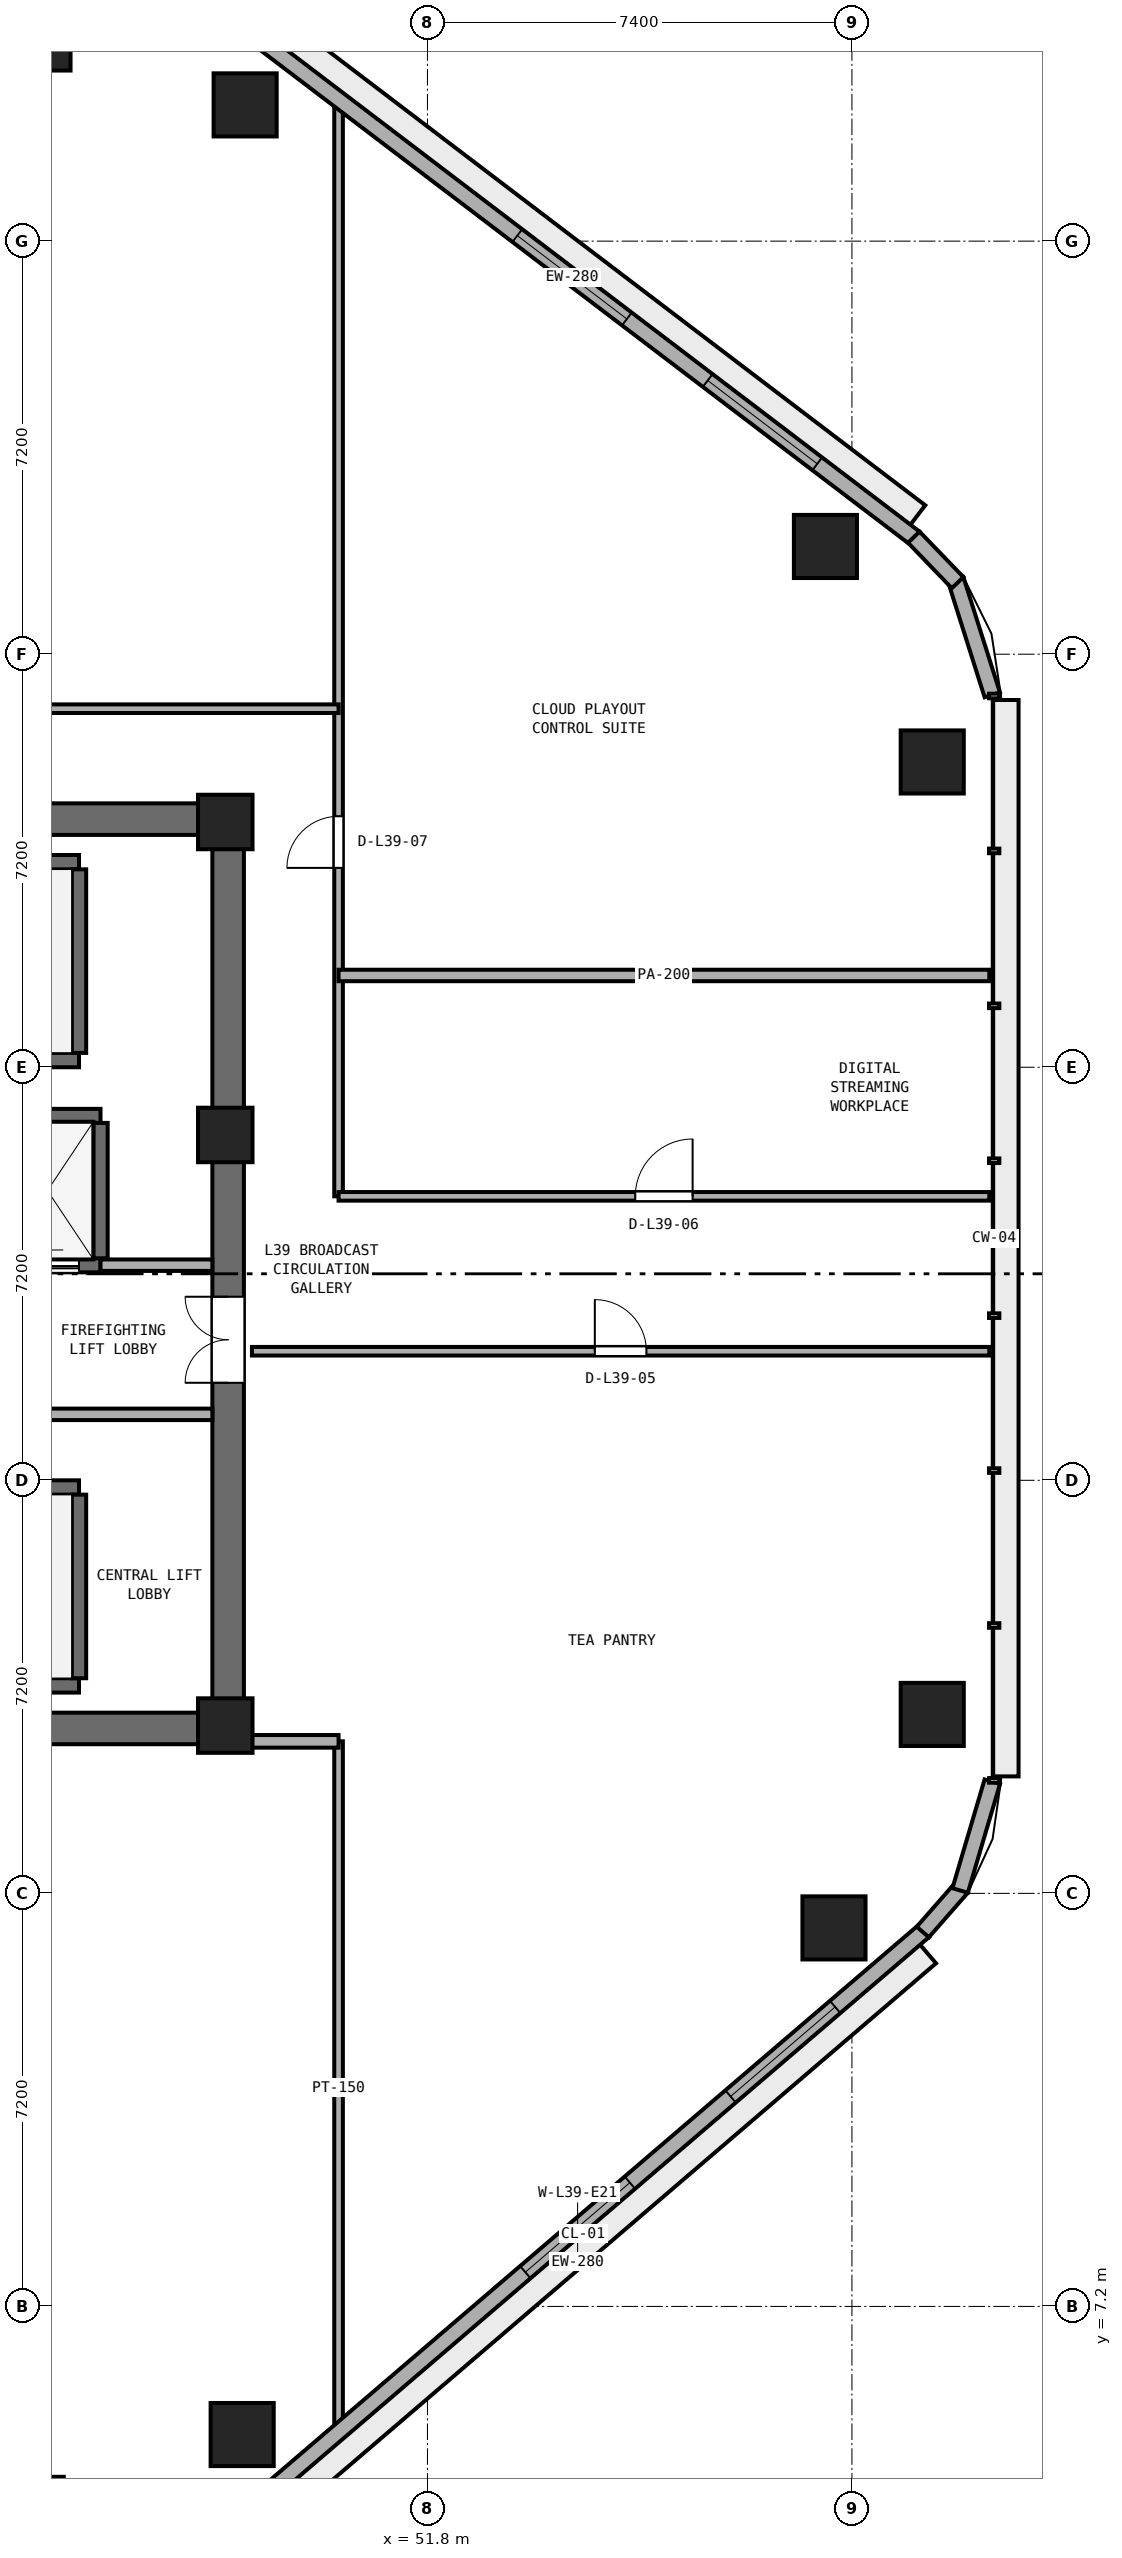
"""IFC4 building model, lengths in metres.
Left out: names, types, materials, properties, quantities, classifications, styles, units other than length and angle.
Written with IfcOpenShell. Run it as: python <this file> out.ifc"""

import sys

from ifc_helpers import new_model, si_unit, direction, frame, frame_2d, origin, origin_2d, place, context, subcontext, project, spatial, rectangle, extrude, element, fill, save


model = new_model("IFC4")
c1 = context("Model", 3, precision=1e-05, world=origin(), true_north=direction((0.0, 1.0)))
c2 = subcontext(c1, "Body", "Model", "MODEL_VIEW")
j1 = project(units=[si_unit("LENGTHUNIT", "METRE"), si_unit("PLANEANGLEUNIT", "RADIAN")], contexts=[c1])
p1 = place(None, origin())
s1 = spatial("IfcSite", under=j1, at=p1, CompositionType="ELEMENT")
p2 = place(p1, origin())
s2 = spatial("IfcBuilding", under=s1, at=p2, CompositionType="ELEMENT")
p3 = place(p2, frame((0.0, 0.0, 155.4)))
s3 = spatial("IfcBuildingStorey", under=s2, at=p3, CompositionType="ELEMENT", Elevation=155.4)
for number, where, z_axis, x_axis in (
    (1, (25.4, 17.275, 0.0), (0.0, 0.0, 1.0), (1.0, 0.0, 0.0)),
    (2, (25.4, 33.125, 0.0), (0.0, 0.0, 1.0), (1.0, 0.0, 0.0)),
):
    element("IfcWall", number, at=place(p3, frame(where, z_axis=z_axis, x_axis=x_axis)), inside=s3, PredefinedType="SHEAR", context=c2, shape_type="SweptSolid", body=[
        extrude(rectangle(XDim=23.2, YDim=0.55, at=frame_2d((11.6, 0.0))), origin(), (0.0, 0.0, 1.0), 3.54),
    ])
p4 = place(p3, frame((48.325, 17.55, 0.0), z_axis=(0.0, 0.0, 1.0), x_axis=(0.0, 1.0, 0.0)))
e3 = element("IfcWall", 3, at=p4, inside=s3, PredefinedType="SHEAR", context=c2, shape_type="SweptSolid", body=[
    extrude(rectangle(XDim=15.3, YDim=0.55, at=frame_2d((7.65, 0.0))), origin(), (0.0, 0.0, 1.0), 3.54),
])
p5 = place(p4, frame((5.75, 0.0, 0.0)))
e4 = element("IfcOpeningElement", 4, at=p5, cuts=e3, PredefinedType="OPENING", context=c2, shape_type="SweptSolid", body=[
    extrude(rectangle(XDim=1.5, YDim=2.15, at=frame_2d((0.75, 1.075))), frame((0.0, 0.285, 0.0), z_axis=(0.0, -1.0, 0.0), x_axis=(1.0, 0.0, 0.0)), (0.0, 0.0, 1.0), 0.57),
])
for number, where, z_axis, x_axis in (
    (5, (48.275, 17.325, 0.0), (0.0, 0.0, 1.0), (1.0, 0.0, 0.0)),
    (6, (48.275, 27.62, 0.0), (0.0, 0.0, 1.0), (1.0, 0.0, 0.0)),
    (7, (48.275, 33.075, 0.0), (0.0, 0.0, 1.0), (1.0, 0.0, 0.0)),
):
    element("IfcColumn", number, at=place(p3, frame(where, z_axis=z_axis, x_axis=x_axis)), inside=s3, PredefinedType="PILASTER", context=c2, shape_type="SweptSolid", body=[
        extrude(rectangle(XDim=0.95, YDim=0.95, at=origin_2d()), origin(), (0.0, 0.0, 1.0), 3.8),
    ])
for number, where, z_axis, x_axis in (
    (8, (44.91, 3.68, 0.0), (0.0, 0.0, 1.0), (1.0, 0.0, 0.0)),
    (9, (48.57, 4.967, 0.0), (0.0, 0.0, 1.0), (1.0, 0.0, 0.0)),
    (10, (58.887, 13.798, 0.0), (0.0, 0.0, 1.0), (1.0, 0.0, 0.0)),
    (11, (60.6, 17.519, 0.0), (0.0, 0.0, 1.0), (1.0, 0.0, 0.0)),
    (12, (60.6, 34.122, 0.0), (0.0, 0.0, 1.0), (1.0, 0.0, 0.0)),
    (13, (58.738, 37.878, 0.0), (0.0, 0.0, 1.0), (1.0, 0.0, 0.0)),
    (14, (48.622, 45.575, 0.0), (0.0, 0.0, 1.0), (1.0, 0.0, 0.0)),
    (15, (45.028, 46.724, 0.0), (0.0, 0.0, 1.0), (1.0, 0.0, 0.0)),
):
    element("IfcColumn", number, at=place(p3, frame(where, z_axis=z_axis, x_axis=x_axis)), inside=s3, PredefinedType="COLUMN", context=c2, shape_type="SweptSolid", body=[
        extrude(rectangle(XDim=1.1, YDim=1.1, at=origin_2d()), origin(), (0.0, 0.0, 1.0), 3.8),
    ])
for number, where, z_axis, x_axis in (
    (16, (38.425, 28.925, 0.0), (0.0, 0.0, 1.0), (1.0, 0.0, 0.0)),
    (17, (38.425, 32.375, 0.0), (0.0, 0.0, 1.0), (1.0, 0.0, 0.0)),
):
    element("IfcWall", number, at=place(p3, frame(where, z_axis=z_axis, x_axis=x_axis)), inside=s3, PredefinedType="SHEAR", context=c2, shape_type="SweptSolid", body=[
        extrude(rectangle(XDim=7.3, YDim=0.25, at=frame_2d((3.65, 0.0))), origin(), (0.0, 0.0, 1.0), 3.54),
    ])
p6 = place(p3, frame((45.725, 29.05, 0.0), z_axis=(0.0, 0.0, 1.0), x_axis=(0.0, 1.0, 0.0)))
e18 = element("IfcWall", 18, at=p6, inside=s3, PredefinedType="SHEAR", context=c2, shape_type="SweptSolid", body=[
    extrude(rectangle(XDim=3.2, YDim=0.25, at=frame_2d((1.6, 0.0))), origin(), (0.0, 0.0, 1.0), 3.54),
])
for number, where, z_axis, x_axis in (
    (19, (38.425, 18.025, 0.0), (0.0, 0.0, 1.0), (1.0, 0.0, 0.0)),
    (20, (38.425, 21.475, 0.0), (0.0, 0.0, 1.0), (1.0, 0.0, 0.0)),
):
    element("IfcWall", number, at=place(p3, frame(where, z_axis=z_axis, x_axis=x_axis)), inside=s3, PredefinedType="SHEAR", context=c2, shape_type="SweptSolid", body=[
        extrude(rectangle(XDim=7.3, YDim=0.25, at=frame_2d((3.65, 0.0))), origin(), (0.0, 0.0, 1.0), 3.54),
    ])
p7 = place(p3, frame((45.725, 18.15, 0.0), z_axis=(0.0, 0.0, 1.0), x_axis=(0.0, 1.0, 0.0)))
e21 = element("IfcWall", 21, at=p7, inside=s3, PredefinedType="SHEAR", context=c2, shape_type="SweptSolid", body=[
    extrude(rectangle(XDim=3.2, YDim=0.25, at=frame_2d((1.6, 0.0))), origin(), (0.0, 0.0, 1.0), 3.54),
])
p8 = place(p3, frame((44.25, 25.35, 0.0), z_axis=(0.0, 0.0, 1.0), x_axis=(1.0, 0.0, 0.0)))
e22 = element("IfcWall", 22, at=p8, inside=s3, PredefinedType="SHEAR", context=c2, shape_type="SweptSolid", body=[
    extrude(rectangle(XDim=1.85, YDim=0.25, at=frame_2d((0.925, 0.0))), origin(), (0.0, 0.0, 1.0), 3.54),
])
p9 = place(p8, frame((0.375, 0.0, 0.0)))
e23 = element("IfcOpeningElement", 23, at=p9, cuts=e22, PredefinedType="OPENING", context=c2, shape_type="SweptSolid", body=[
    extrude(rectangle(XDim=1.1, YDim=2.15, at=frame_2d((0.55, 1.075))), frame((0.0, 0.135, 0.0), z_axis=(0.0, -1.0, 0.0), x_axis=(1.0, 0.0, 0.0)), (0.0, 0.0, 1.0), 0.27),
])
p10 = place(p3, frame((44.25, 27.95, 0.0), z_axis=(0.0, 0.0, 1.0), x_axis=(1.0, 0.0, 0.0)))
e24 = element("IfcWall", 24, at=p10, inside=s3, PredefinedType="SHEAR", context=c2, shape_type="SweptSolid", body=[
    extrude(rectangle(XDim=1.85, YDim=0.25, at=frame_2d((0.925, 0.0))), origin(), (0.0, 0.0, 1.0), 3.54),
])
p11 = place(p3, frame((46.1, 25.47, 0.0), z_axis=(0.0, 0.0, 1.0), x_axis=(0.0, 1.0, 0.0)))
e25 = element("IfcWall", 25, at=p11, inside=s3, PredefinedType="SHEAR", context=c2, shape_type="SweptSolid", body=[
    extrude(rectangle(XDim=2.36, YDim=0.25, at=frame_2d((1.18, 0.0))), origin(), (0.0, 0.0, 1.0), 3.54),
])
p12 = place(p3, frame((42.0, 22.75, 0.0), z_axis=(0.0, 0.0, 1.0), x_axis=(1.0, 0.0, 0.0)))
e26 = element("IfcWall", 26, at=p12, inside=s3, PredefinedType="SOLIDWALL", context=c2, shape_type="SweptSolid", body=[
    extrude(rectangle(XDim=6.05, YDim=0.2, at=frame_2d((3.025, 0.0))), origin(), (0.0, 0.0, 1.0), 3.54),
])
p13 = place(p3, frame((46.1, 25.35, 0.0), z_axis=(0.0, 0.0, 1.0), x_axis=(1.0, 0.0, 0.0)))
e27 = element("IfcWall", 27, at=p13, inside=s3, PredefinedType="SOLIDWALL", context=c2, shape_type="SweptSolid", body=[
    extrude(rectangle(XDim=1.95, YDim=0.2, at=frame_2d((0.975, 0.0))), origin(), (0.0, 0.0, 1.0), 3.54),
])
p14 = place(p3, frame((50.25, 4.966, 0.0), z_axis=(0.0, 0.0, 1.0), x_axis=(0.0, 1.0, 0.0)))
e28 = element("IfcWall", 28, at=p14, inside=s3, PredefinedType="PARTITIONING", context=c2, shape_type="SweptSolid", body=[
    extrude(rectangle(XDim=12.084, YDim=0.15, at=frame_2d((6.042, 0.0))), origin(), (0.0, 0.0, 1.0), 3.54),
])
p15 = place(p3, frame((50.25, 26.55, 0.0), z_axis=(0.0, 0.0, 1.0), x_axis=(0.0, 1.0, 0.0)))
e29 = element("IfcWall", 29, at=p15, inside=s3, PredefinedType="PARTITIONING", context=c2, shape_type="SweptSolid", body=[
    extrude(rectangle(XDim=19.154, YDim=0.15, at=frame_2d((9.577, 0.0))), origin(), (0.0, 0.0, 1.0), 3.54),
])
p16 = place(p15, frame((5.725, 0.0, 0.0)))
e30 = element("IfcOpeningElement", 30, at=p16, cuts=e29, PredefinedType="OPENING", context=c2, shape_type="SweptSolid", body=[
    extrude(rectangle(XDim=0.9, YDim=2.1, at=frame_2d((0.45, 1.05))), frame((0.0, 0.085, 0.0), z_axis=(0.0, -1.0, 0.0), x_axis=(1.0, 0.0, 0.0)), (0.0, 0.0, 1.0), 0.17),
])
p17 = place(p3, frame((48.74, 17.05, 0.0), z_axis=(0.0, 0.0, 1.0), x_axis=(1.0, 0.0, 0.0)))
e31 = element("IfcWall", 31, at=p17, inside=s3, PredefinedType="PARTITIONING", context=c2, shape_type="SweptSolid", body=[
    extrude(rectangle(XDim=1.51, YDim=0.22, at=frame_2d((0.755, 0.0))), origin(), (0.0, 0.0, 1.0), 2.923),
])
p18 = place(p3, frame((48.74, 23.85, 0.0), z_axis=(0.0, 0.0, 1.0), x_axis=(1.0, 0.0, 0.0)))
e32 = element("IfcWall", 32, at=p18, inside=s3, PredefinedType="PARTITIONING", context=c2, shape_type="SweptSolid", body=[
    extrude(rectangle(XDim=12.855, YDim=0.15, at=frame_2d((6.427, 0.0))), origin(), (0.0, 0.0, 1.0), 3.54),
])
p19 = place(p18, frame((5.978, 0.0, 0.0)))
e33 = element("IfcOpeningElement", 33, at=p19, cuts=e32, PredefinedType="OPENING", context=c2, shape_type="SweptSolid", body=[
    extrude(rectangle(XDim=0.9, YDim=2.1, at=frame_2d((0.45, 1.05))), frame((0.0, 0.085, 0.0), z_axis=(0.0, -1.0, 0.0), x_axis=(1.0, 0.0, 0.0)), (0.0, 0.0, 1.0), 0.17),
])
p20 = place(p3, frame((50.25, 26.55, 0.0), z_axis=(0.0, 0.0, 1.0), x_axis=(1.0, 0.0, 0.0)))
e34 = element("IfcWall", 34, at=p20, inside=s3, PredefinedType="PARTITIONING", context=c2, shape_type="SweptSolid", body=[
    extrude(rectangle(XDim=11.345, YDim=0.15, at=frame_2d((5.672, 0.0))), origin(), (0.0, 0.0, 1.0), 3.54),
])
p21 = place(p20, frame((5.173, 0.0, 0.0)))
e35 = element("IfcOpeningElement", 35, at=p21, cuts=e34, PredefinedType="OPENING", context=c2, shape_type="SweptSolid", body=[
    extrude(rectangle(XDim=1.0, YDim=2.12, at=frame_2d((0.5, 1.06))), frame((0.0, 0.085, 0.0), z_axis=(0.0, -1.0, 0.0), x_axis=(1.0, 0.0, 0.0)), (0.0, 0.0, 1.0), 0.17),
])
p22 = place(p3, frame((50.25, 30.4, 0.0), z_axis=(0.0, 0.0, 1.0), x_axis=(1.0, 0.0, 0.0)))
e36 = element("IfcWall", 36, at=p22, inside=s3, PredefinedType="PARTITIONING", context=c2, shape_type="SweptSolid", body=[
    extrude(rectangle(XDim=11.345, YDim=0.2, at=frame_2d((5.672, 0.0))), origin(), (0.0, 0.0, 1.0), 3.54),
])
p23 = place(p3, frame((23.75, 35.05, 0.0), z_axis=(0.0, 0.0, 1.0), x_axis=(1.0, 0.0, 0.0)))
e37 = element("IfcWall", 37, at=p23, inside=s3, PredefinedType="PARTITIONING", context=c2, shape_type="SweptSolid", body=[
    extrude(rectangle(XDim=26.5, YDim=0.15, at=frame_2d((13.25, 0.0))), origin(), (0.0, 0.0, 1.0), 3.54),
])
p24 = place(p23, frame((12.75, 0.0, 0.0)))
e38 = element("IfcOpeningElement", 38, at=p24, cuts=e37, PredefinedType="OPENING", context=c2, shape_type="SweptSolid", body=[
    extrude(rectangle(XDim=1.0, YDim=2.12, at=frame_2d((0.5, 1.06))), frame((0.0, 0.085, 0.0), z_axis=(0.0, -1.0, 0.0), x_axis=(1.0, 0.0, 0.0)), (0.0, 0.0, 1.0), 0.17),
])
p25 = place(p3, frame((48.385, 3.414, 0.0), z_axis=(0.0, 0.0, 1.0), x_axis=(0.759700260779, 0.650273414628, 0.0)))
e39 = element("IfcWall", 39, at=p25, inside=s3, PredefinedType="STANDARD", context=c2, shape_type="SweptSolid", body=[
    extrude(rectangle(XDim=15.881, YDim=0.28, at=frame_2d((7.94, 0.0))), origin(), (0.0, 0.0, 1.0), 3.54),
])
p26 = place(p25, frame((6.74, 0.0, 0.9)))
e40 = element("IfcOpeningElement", 40, at=p26, cuts=e39, PredefinedType="OPENING", context=c2, shape_type="SweptSolid", body=[
    extrude(rectangle(XDim=2.4, YDim=1.75, at=frame_2d((1.2, 0.875))), frame((0.0, 0.15, 0.0), z_axis=(0.0, -1.0, 0.0), x_axis=(1.0, 0.0, 0.0)), (0.0, 0.0, 1.0), 0.3),
])
p27 = place(p25, frame((11.451, 0.0, 0.9)))
e41 = element("IfcOpeningElement", 41, at=p27, cuts=e39, PredefinedType="OPENING", context=c2, shape_type="SweptSolid", body=[
    extrude(rectangle(XDim=2.4, YDim=1.75, at=frame_2d((1.2, 0.875))), frame((0.0, 0.15, 0.0), z_axis=(0.0, -1.0, 0.0), x_axis=(1.0, 0.0, 0.0)), (0.0, 0.0, 1.0), 0.3),
])
p28 = place(p3, frame((60.295, 38.025, 0.0), z_axis=(0.0, 0.0, 1.0), x_axis=(-0.795831760834, 0.605517801925, 0.0)))
e42 = element("IfcWall", 42, at=p28, inside=s3, PredefinedType="STANDARD", context=c2, shape_type="SweptSolid", body=[
    extrude(rectangle(XDim=15.012, YDim=0.28, at=frame_2d((7.506, 0.0))), origin(), (0.0, 0.0, 1.0), 3.54),
])
p29 = place(p28, frame((2.135, 0.0, 0.9)))
e43 = element("IfcOpeningElement", 43, at=p29, cuts=e42, PredefinedType="OPENING", context=c2, shape_type="SweptSolid", body=[
    extrude(rectangle(XDim=2.4, YDim=1.75, at=frame_2d((1.2, 0.875))), frame((0.0, 0.15, 0.0), z_axis=(0.0, -1.0, 0.0), x_axis=(1.0, 0.0, 0.0)), (0.0, 0.0, 1.0), 0.3),
])
p30 = place(p28, frame((6.306, 0.0, 0.9)))
e44 = element("IfcOpeningElement", 44, at=p30, cuts=e42, PredefinedType="OPENING", context=c2, shape_type="SweptSolid", body=[
    extrude(rectangle(XDim=2.4, YDim=1.75, at=frame_2d((1.2, 0.875))), frame((0.0, 0.15, 0.0), z_axis=(0.0, -1.0, 0.0), x_axis=(1.0, 0.0, 0.0)), (0.0, 0.0, 1.0), 0.3),
])
p31 = place(p3, frame((60.436, 13.727, 0.0), z_axis=(0.0, 0.0, 1.0), x_axis=(0.658571618609, 0.752518055041, 0.0)))
e45 = element("IfcWall", 45, at=p31, inside=s3, PredefinedType="STANDARD", context=c2, shape_type="SweptSolid", body=[
    extrude(rectangle(XDim=1.032, YDim=0.28, at=frame_2d((0.516, 0.0))), origin(), (0.0, 0.0, 1.0), 3.54),
])
p32 = place(p3, frame((61.086, 14.45, 0.0), z_axis=(0.0, 0.0, 1.0), x_axis=(0.283596460917, 0.958943714383, 0.0)))
e46 = element("IfcWall", 46, at=p32, inside=s3, PredefinedType="STANDARD", context=c2, shape_type="SweptSolid", body=[
    extrude(rectangle(XDim=1.978, YDim=0.28, at=frame_2d((0.989, 0.0))), origin(), (0.0, 0.0, 1.0), 3.54),
])
p33 = place(p3, frame((61.647, 35.291, 0.0), z_axis=(0.0, 0.0, 1.0), x_axis=(-0.302095077495, 0.953277800095, 0.0)))
e47 = element("IfcWall", 47, at=p33, inside=s3, PredefinedType="STANDARD", context=c2, shape_type="SweptSolid", body=[
    extrude(rectangle(XDim=2.109, YDim=0.28, at=frame_2d((1.055, 0.0))), origin(), (0.0, 0.0, 1.0), 3.54),
])
p34 = place(p3, frame((61.042, 37.247, 0.0), z_axis=(0.0, 0.0, 1.0), x_axis=(-0.694004126367, 0.719971022045, 0.0)))
e48 = element("IfcWall", 48, at=p34, inside=s3, PredefinedType="STANDARD", context=c2, shape_type="SweptSolid", body=[
    extrude(rectangle(XDim=1.1, YDim=0.28, at=frame_2d((0.55, 0.0))), origin(), (0.0, 0.0, 1.0), 3.54),
])
p35 = place(p9, origin())
e49 = element("IfcDoor", 49, at=p35, inside=s3, OperationType="DOUBLE_DOOR_SLIDING", PredefinedType="DOOR", context=c2, shape_type="SweptSolid", body=[
    extrude(rectangle(XDim=1.1, YDim=2.15, at=frame_2d((0.55, 1.075))), frame((0.0, 0.025, 0.0), z_axis=(0.0, -1.0, 0.0), x_axis=(1.0, 0.0, 0.0)), (0.0, 0.0, 1.0), 0.05),
])
fill(e23, e49)
p36 = place(p5, origin())
e50 = element("IfcDoor", 50, at=p36, inside=s3, OperationType="DOUBLE_DOOR_SINGLE_SWING", PredefinedType="DOOR", context=c2, shape_type="SweptSolid", body=[
    extrude(rectangle(XDim=1.5, YDim=2.15, at=frame_2d((0.75, 1.075))), frame((0.0, 0.025, 0.0), z_axis=(0.0, -1.0, 0.0), x_axis=(1.0, 0.0, 0.0)), (0.0, 0.0, 1.0), 0.05),
])
fill(e4, e50)
p37 = place(p19, origin())
e51 = element("IfcDoor", 51, at=p37, inside=s3, OperationType="SINGLE_SWING_LEFT", PredefinedType="DOOR", context=c2, shape_type="SweptSolid", body=[
    extrude(rectangle(XDim=0.9, YDim=2.1, at=frame_2d((0.45, 1.05))), frame((0.0, 0.025, 0.0), z_axis=(0.0, -1.0, 0.0), x_axis=(1.0, 0.0, 0.0)), (0.0, 0.0, 1.0), 0.05),
])
fill(e33, e51)
p38 = place(p21, origin())
e52 = element("IfcDoor", 52, at=p38, inside=s3, OperationType="SINGLE_SWING_RIGHT", PredefinedType="DOOR", context=c2, shape_type="SweptSolid", body=[
    extrude(rectangle(XDim=1.0, YDim=2.12, at=frame_2d((0.5, 1.06))), frame((0.0, 0.025, 0.0), z_axis=(0.0, -1.0, 0.0), x_axis=(1.0, 0.0, 0.0)), (0.0, 0.0, 1.0), 0.05),
])
fill(e35, e52)
p39 = place(p16, origin())
e53 = element("IfcDoor", 53, at=p39, inside=s3, OperationType="SINGLE_SWING_LEFT", PredefinedType="DOOR", context=c2, shape_type="SweptSolid", body=[
    extrude(rectangle(XDim=0.9, YDim=2.1, at=frame_2d((0.45, 1.05))), frame((0.0, 0.025, 0.0), z_axis=(0.0, -1.0, 0.0), x_axis=(1.0, 0.0, 0.0)), (0.0, 0.0, 1.0), 0.05),
])
fill(e30, e53)
p40 = place(p26, origin())
e54 = element("IfcWindow", 54, at=p40, inside=s3, PartitioningType="SINGLE_PANEL", PredefinedType="WINDOW", context=c2, shape_type="SweptSolid", body=[
    extrude(rectangle(XDim=2.4, YDim=1.75, at=frame_2d((1.2, 0.875))), frame((0.0, 0.03, 0.0), z_axis=(0.0, -1.0, 0.0), x_axis=(1.0, 0.0, 0.0)), (0.0, 0.0, 1.0), 0.06),
])
fill(e40, e54)
p41 = place(p27, origin())
e55 = element("IfcWindow", 55, at=p41, inside=s3, PartitioningType="SINGLE_PANEL", PredefinedType="WINDOW", context=c2, shape_type="SweptSolid", body=[
    extrude(rectangle(XDim=2.4, YDim=1.75, at=frame_2d((1.2, 0.875))), frame((0.0, 0.03, 0.0), z_axis=(0.0, -1.0, 0.0), x_axis=(1.0, 0.0, 0.0)), (0.0, 0.0, 1.0), 0.06),
])
fill(e41, e55)
p42 = place(p29, origin())
e56 = element("IfcWindow", 56, at=p42, inside=s3, PartitioningType="SINGLE_PANEL", PredefinedType="WINDOW", context=c2, shape_type="SweptSolid", body=[
    extrude(rectangle(XDim=2.4, YDim=1.75, at=frame_2d((1.2, 0.875))), frame((0.0, 0.03, 0.0), z_axis=(0.0, -1.0, 0.0), x_axis=(1.0, 0.0, 0.0)), (0.0, 0.0, 1.0), 0.06),
])
fill(e43, e56)
p43 = place(p30, origin())
e57 = element("IfcWindow", 57, at=p43, inside=s3, PartitioningType="SINGLE_PANEL", PredefinedType="WINDOW", context=c2, shape_type="SweptSolid", body=[
    extrude(rectangle(XDim=2.4, YDim=1.75, at=frame_2d((1.2, 0.875))), frame((0.0, 0.03, 0.0), z_axis=(0.0, -1.0, 0.0), x_axis=(1.0, 0.0, 0.0)), (0.0, 0.0, 1.0), 0.06),
])
fill(e44, e57)
save(model, sys.argv[1])
